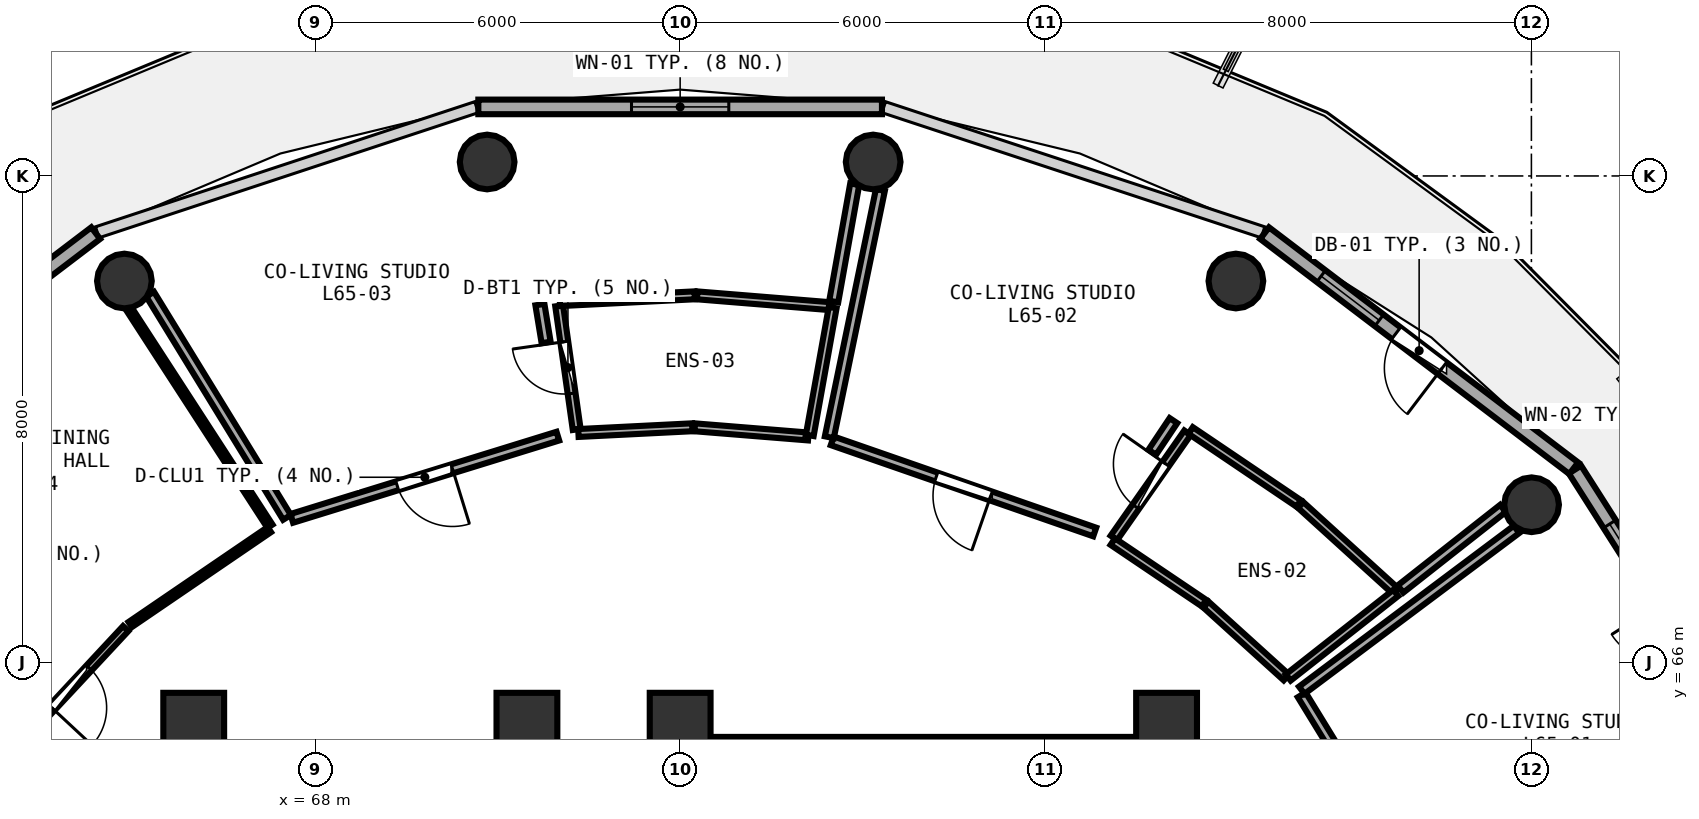
"""IFC4 building model, lengths in metres.
Left out: names, types, materials, properties, quantities, classifications, styles, units other than length and angle.
Written with IfcOpenShell. Run it as: python <this file> out.ifc"""

import sys

from ifc_helpers import new_model, si_unit, direction, frame, frame_2d, origin, origin_2d, place, context, subcontext, project, spatial, rectangle, circle, extrude, element, fill, save


model = new_model("IFC4")
c1 = context("Model", 3, precision=1e-05, world=origin(), true_north=direction((0.0, 1.0)))
c2 = subcontext(c1, "Body", "Model", "MODEL_VIEW")
j1 = project(units=[si_unit("LENGTHUNIT", "METRE"), si_unit("PLANEANGLEUNIT", "RADIAN")], contexts=[c1])
p1 = place(None, origin())
s1 = spatial("IfcSite", under=j1, at=p1, CompositionType="ELEMENT")
p2 = place(p1, origin())
s2 = spatial("IfcBuilding", under=s1, at=p2, CompositionType="ELEMENT")
p3 = place(p2, frame((0.0, 0.0, 256.2)))
s3 = spatial("IfcBuildingStorey", under=s2, at=p3, CompositionType="ELEMENT", Elevation=256.2)
for number, where, z_axis, x_axis in (
    (1, (82.0, 65.0, 0.0), (0.0, 0.0, 1.0), (1.0, 0.0, 0.0)),
    (2, (74.0, 65.0, 0.0), (0.0, 0.0, 1.0), (1.0, 0.0, 0.0)),
    (3, (71.48, 65.0, 0.0), (0.0, 0.0, 1.0), (1.0, 0.0, 0.0)),
    (4, (66.0, 65.0, 0.0), (0.0, 0.0, 1.0), (1.0, 0.0, 0.0)),
):
    element("IfcColumn", number, at=place(p3, frame(where, z_axis=z_axis, x_axis=x_axis)), inside=s3, PredefinedType="PILASTER", context=c2, shape_type="SweptSolid", body=[
        extrude(rectangle(XDim=1.0, YDim=1.0, at=origin_2d()), origin(), (0.0, 0.0, 1.0), 3.75),
    ])
for number, where, z_axis, x_axis in (
    (5, (88.003, 68.593, 0.0), (0.0, 0.0, 1.0), (1.0, 0.0, 0.0)),
    (6, (83.14, 72.272, 0.0), (0.0, 0.0, 1.0), (1.0, 0.0, 0.0)),
    (7, (77.174, 74.229, 0.0), (0.0, 0.0, 1.0), (1.0, 0.0, 0.0)),
    (8, (70.826, 74.229, 0.0), (0.0, 0.0, 1.0), (1.0, 0.0, 0.0)),
    (9, (64.86, 72.272, 0.0), (0.0, 0.0, 1.0), (1.0, 0.0, 0.0)),
):
    element("IfcColumn", number, at=place(p3, frame(where, z_axis=z_axis, x_axis=x_axis)), inside=s3, PredefinedType="COLUMN", context=c2, shape_type="SweptSolid", body=[
        extrude(circle(Radius=0.45, at=origin_2d()), origin(), (0.0, 0.0, 1.0), 3.75),
    ])
p4 = place(p3, frame((92.034, 63.964, 0.0), z_axis=(0.0, 0.0, 1.0), x_axis=(-0.537271968456, 0.843409053728, 0.0)))
e10 = element("IfcWall", 10, at=p4, inside=s3, PredefinedType="SOLIDWALL", context=c2, shape_type="SweptSolid", body=[
    extrude(rectangle(XDim=6.175, YDim=0.24, at=frame_2d((3.087, 0.0))), origin(), (0.0, 0.0, 1.0), 3.475),
])
p5 = place(p4, frame((2.613, 0.0, 0.0)))
e11 = element("IfcOpeningElement", 11, at=p5, cuts=e10, PredefinedType="OPENING", context=c2, shape_type="SweptSolid", body=[
    extrude(rectangle(XDim=0.95, YDim=2.1, at=frame_2d((0.475, 1.05))), frame((0.0, 0.13, 0.0), z_axis=(0.0, -1.0, 0.0), x_axis=(1.0, 0.0, 0.0)), (0.0, 0.0, 1.0), 0.26),
])
p6 = place(p4, frame((3.913, 0.0, 0.85)))
e12 = element("IfcOpeningElement", 12, at=p6, cuts=e10, PredefinedType="OPENING", context=c2, shape_type="SweptSolid", body=[
    extrude(rectangle(XDim=1.2, YDim=1.45, at=frame_2d((0.6, 0.725))), frame((0.0, 0.13, 0.0), z_axis=(0.0, -1.0, 0.0), x_axis=(1.0, 0.0, 0.0)), (0.0, 0.0, 1.0), 0.26),
])
p7 = place(p3, frame((88.696, 69.194, 0.0), z_axis=(0.0, 0.0, 1.0), x_axis=(-0.796010444211, 0.605282886514, 0.0)))
e13 = element("IfcWall", 13, at=p7, inside=s3, PredefinedType="SOLIDWALL", context=c2, shape_type="SweptSolid", body=[
    extrude(rectangle(XDim=6.387, YDim=0.24, at=frame_2d((3.194, 0.0))), origin(), (0.0, 0.0, 1.0), 3.475),
])
p8 = place(p7, frame((2.719, 0.0, 0.0)))
e14 = element("IfcOpeningElement", 14, at=p8, cuts=e13, PredefinedType="OPENING", context=c2, shape_type="SweptSolid", body=[
    extrude(rectangle(XDim=0.95, YDim=2.1, at=frame_2d((0.475, 1.05))), frame((0.0, 0.13, 0.0), z_axis=(0.0, -1.0, 0.0), x_axis=(1.0, 0.0, 0.0)), (0.0, 0.0, 1.0), 0.26),
])
p9 = place(p7, frame((4.019, 0.0, 0.85)))
e15 = element("IfcOpeningElement", 15, at=p9, cuts=e13, PredefinedType="OPENING", context=c2, shape_type="SweptSolid", body=[
    extrude(rectangle(XDim=1.2, YDim=1.45, at=frame_2d((0.6, 0.725))), frame((0.0, 0.13, 0.0), z_axis=(0.0, -1.0, 0.0), x_axis=(1.0, 0.0, 0.0)), (0.0, 0.0, 1.0), 0.26),
])
p10 = place(p3, frame((77.319, 75.136, 0.0), z_axis=(0.0, 0.0, 1.0), x_axis=(-1.0, 0.0, 0.0)))
e16 = element("IfcWall", 16, at=p10, inside=s3, PredefinedType="SOLIDWALL", context=c2, shape_type="SweptSolid", body=[
    extrude(rectangle(XDim=6.638, YDim=0.24, at=frame_2d((3.319, 0.0))), origin(), (0.0, 0.0, 1.0), 3.475),
])
p11 = place(p10, frame((2.519, 0.0, 0.85)))
e17 = element("IfcOpeningElement", 17, at=p11, cuts=e16, PredefinedType="OPENING", context=c2, shape_type="SweptSolid", body=[
    extrude(rectangle(XDim=1.6, YDim=1.45, at=frame_2d((0.8, 0.725))), frame((0.0, 0.13, 0.0), z_axis=(0.0, -1.0, 0.0), x_axis=(1.0, 0.0, 0.0)), (0.0, 0.0, 1.0), 0.26),
])
p12 = place(p3, frame((64.388, 73.06, 0.0), z_axis=(0.0, 0.0, 1.0), x_axis=(-0.796010444211, -0.605282886514, 0.0)))
e18 = element("IfcWall", 18, at=p12, inside=s3, PredefinedType="SOLIDWALL", context=c2, shape_type="SweptSolid", body=[
    extrude(rectangle(XDim=6.387, YDim=0.24, at=frame_2d((3.194, 0.0))), origin(), (0.0, 0.0, 1.0), 3.475),
])
p13 = place(p12, frame((2.394, 0.0, 0.85)))
e19 = element("IfcOpeningElement", 19, at=p13, cuts=e18, PredefinedType="OPENING", context=c2, shape_type="SweptSolid", body=[
    extrude(rectangle(XDim=1.6, YDim=1.45, at=frame_2d((0.8, 0.725))), frame((0.0, 0.13, 0.0), z_axis=(0.0, -1.0, 0.0), x_axis=(1.0, 0.0, 0.0)), (0.0, 0.0, 1.0), 0.26),
])
p14 = place(p3, frame((74.0, 64.6, 0.0), z_axis=(0.0, 0.0, 1.0), x_axis=(1.0, 0.0, 0.0)))
e20 = element("IfcWall", 20, at=p14, inside=s3, PredefinedType="SHEAR", context=c2, shape_type="SweptSolid", body=[
    extrude(rectangle(XDim=8.0, YDim=0.35, at=frame_2d((4.0, 0.0))), origin(), (0.0, 0.0, 1.0), 3.49),
])
p15 = place(p3, frame((86.456, 61.824, 0.0), z_axis=(0.0, 0.0, 1.0), x_axis=(-0.522665227064, 0.852538011128, 0.0)))
e21 = element("IfcWall", 21, at=p15, inside=s3, PredefinedType="PARTITIONING", context=c2, shape_type="SweptSolid", body=[
    extrude(rectangle(XDim=4.273, YDim=0.15, at=frame_2d((2.136, 0.0))), origin(), (0.0, 0.0, 1.0), 3.075),
])
p16 = place(p15, frame((1.661, 0.0, 0.0)))
e22 = element("IfcOpeningElement", 22, at=p16, cuts=e21, PredefinedType="OPENING", context=c2, shape_type="SweptSolid", body=[
    extrude(rectangle(XDim=0.95, YDim=2.08, at=frame_2d((0.475, 1.04))), frame((0.0, 0.085, 0.0), z_axis=(0.0, -1.0, 0.0), x_axis=(1.0, 0.0, 0.0)), (0.0, 0.0, 1.0), 0.17),
])
p17 = place(p3, frame((81.133, 68.047, 0.0), z_axis=(0.0, 0.0, 1.0), x_axis=(0.573578732096, 0.819150436787, 0.0)))
e23 = element("IfcWall", 23, at=p17, inside=s3, PredefinedType="PLUMBINGWALL", context=c2, shape_type="SweptSolid", body=[
    extrude(rectangle(XDim=2.112, YDim=0.13, at=frame_2d((1.056, 0.0))), origin(), (0.0, 0.0, 1.0), 3.175),
])
p18 = place(p17, frame((0.626, 0.0, 0.0)))
e24 = element("IfcOpeningElement", 24, at=p18, cuts=e23, PredefinedType="OPENING", context=c2, shape_type="SweptSolid", body=[
    extrude(rectangle(XDim=0.86, YDim=2.05, at=frame_2d((0.43, 1.025))), frame((0.0, 0.075, 0.0), z_axis=(0.0, -1.0, 0.0), x_axis=(1.0, 0.0, 0.0)), (0.0, 0.0, 1.0), 0.15),
])
p19 = place(p3, frame((80.818, 68.145, 0.0), z_axis=(0.0, 0.0, 1.0), x_axis=(-0.944627899296, 0.328143462331, 0.0)))
e25 = element("IfcWall", 25, at=p19, inside=s3, PredefinedType="PARTITIONING", context=c2, shape_type="SweptSolid", body=[
    extrude(rectangle(XDim=4.57, YDim=0.15, at=frame_2d((2.285, 0.0))), origin(), (0.0, 0.0, 1.0), 3.48),
])
p20 = place(p19, frame((1.81, 0.0, 0.0)))
e26 = element("IfcOpeningElement", 26, at=p20, cuts=e25, PredefinedType="OPENING", context=c2, shape_type="SweptSolid", body=[
    extrude(rectangle(XDim=0.95, YDim=2.08, at=frame_2d((0.475, 1.04))), frame((0.0, 0.085, 0.0), z_axis=(0.0, -1.0, 0.0), x_axis=(1.0, 0.0, 0.0)), (0.0, 0.0, 1.0), 0.17),
])
p21 = place(p3, frame((72.299, 69.831, 0.0), z_axis=(0.0, 0.0, 1.0), x_axis=(-0.14028943716, 0.990110536163, 0.0)))
e27 = element("IfcWall", 27, at=p21, inside=s3, PredefinedType="PLUMBINGWALL", context=c2, shape_type="SweptSolid", body=[
    extrude(rectangle(XDim=2.053, YDim=0.13, at=frame_2d((1.027, 0.0))), origin(), (0.0, 0.0, 1.0), 3.175),
])
p22 = place(p21, frame((0.597, 0.0, 0.0)))
e28 = element("IfcOpeningElement", 28, at=p22, cuts=e27, PredefinedType="OPENING", context=c2, shape_type="SweptSolid", body=[
    extrude(rectangle(XDim=0.86, YDim=2.05, at=frame_2d((0.43, 1.025))), frame((0.0, 0.075, 0.0), z_axis=(0.0, -1.0, 0.0), x_axis=(1.0, 0.0, 0.0)), (0.0, 0.0, 1.0), 0.15),
])
p23 = place(p3, frame((71.989, 69.721, 0.0), z_axis=(0.0, 0.0, 1.0), x_axis=(-0.955414123224, -0.295269119863, 0.0)))
e29 = element("IfcWall", 29, at=p23, inside=s3, PredefinedType="PARTITIONING", context=c2, shape_type="SweptSolid", body=[
    extrude(rectangle(XDim=4.581, YDim=0.15, at=frame_2d((2.291, 0.0))), origin(), (0.0, 0.0, 1.0), 3.075),
])
p24 = place(p23, frame((1.815, 0.0, 0.0)))
e30 = element("IfcOpeningElement", 30, at=p24, cuts=e29, PredefinedType="OPENING", context=c2, shape_type="SweptSolid", body=[
    extrude(rectangle(XDim=0.95, YDim=2.08, at=frame_2d((0.475, 1.04))), frame((0.0, 0.085, 0.0), z_axis=(0.0, -1.0, 0.0), x_axis=(1.0, 0.0, 0.0)), (0.0, 0.0, 1.0), 0.17),
])
p25 = place(p3, frame((64.882, 66.557, 0.0), z_axis=(0.0, 0.0, 1.0), x_axis=(-0.681315269885, -0.731990097625, 0.0)))
e31 = element("IfcWall", 31, at=p25, inside=s3, PredefinedType="PARTITIONING", context=c2, shape_type="SweptSolid", body=[
    extrude(rectangle(XDim=2.664, YDim=0.12, at=frame_2d((1.332, 0.0))), origin(), (0.0, 0.0, 1.0), 3.075),
])
p26 = place(p25, frame((0.882, 0.0, 0.0)))
e32 = element("IfcOpeningElement", 32, at=p26, cuts=e31, PredefinedType="OPENING", context=c2, shape_type="SweptSolid", body=[
    extrude(rectangle(XDim=0.9, YDim=2.08, at=frame_2d((0.45, 1.04))), frame((0.0, 0.07, 0.0), z_axis=(0.0, -1.0, 0.0), x_axis=(1.0, 0.0, 0.0)), (0.0, 0.0, 1.0), 0.14),
])
p27 = place(p3, frame((84.223, 65.542, 0.0), z_axis=(0.0, 0.0, 1.0), x_axis=(0.800384816546, 0.599486568191, 0.0)))
e33 = element("IfcWall", 33, at=p27, inside=s3, PredefinedType="PARTITIONING", context=c2, shape_type="SweptSolid", body=[
    extrude(rectangle(XDim=4.414, YDim=0.15, at=frame_2d((2.207, 0.0))), origin(), (0.0, 0.0, 1.0), 3.175),
])
p28 = place(p3, frame((83.97, 65.753, 0.0), z_axis=(0.0, 0.0, 1.0), x_axis=(-0.741337974143, 0.671131885767, 0.0)))
e34 = element("IfcWall", 34, at=p28, inside=s3, PredefinedType="PLUMBINGWALL", context=c2, shape_type="SweptSolid", body=[
    extrude(rectangle(XDim=1.784, YDim=0.13, at=frame_2d((0.892, 0.0))), origin(), (0.0, 0.0, 1.0), 3.075),
])
p29 = place(p3, frame((82.616, 66.975, 0.0), z_axis=(0.0, 0.0, 1.0), x_axis=(-0.82921750612, 0.558926048367, 0.0)))
e35 = element("IfcWall", 35, at=p29, inside=s3, PredefinedType="PLUMBINGWALL", context=c2, shape_type="SweptSolid", body=[
    extrude(rectangle(XDim=1.81, YDim=0.13, at=frame_2d((0.905, 0.0))), origin(), (0.0, 0.0, 1.0), 3.075),
])
p30 = place(p3, frame((82.396, 69.815, 0.0), z_axis=(0.0, 0.0, 1.0), x_axis=(0.828761584291, -0.559601855254, 0.0)))
e36 = element("IfcWall", 36, at=p30, inside=s3, PredefinedType="PLUMBINGWALL", context=c2, shape_type="SweptSolid", body=[
    extrude(rectangle(XDim=2.145, YDim=0.13, at=frame_2d((1.073, 0.0))), origin(), (0.0, 0.0, 1.0), 3.075),
])
p31 = place(p3, frame((84.205, 68.59, 0.0), z_axis=(0.0, 0.0, 1.0), x_axis=(0.740404918602, -0.672161109043, 0.0)))
e37 = element("IfcWall", 37, at=p31, inside=s3, PredefinedType="PLUMBINGWALL", context=c2, shape_type="SweptSolid", body=[
    extrude(rectangle(XDim=2.114, YDim=0.13, at=frame_2d((1.057, 0.0))), origin(), (0.0, 0.0, 1.0), 3.075),
])
p32 = place(p3, frame((85.769, 67.143, 0.0), z_axis=(0.0, 0.0, 1.0), x_axis=(-0.786197810061, -0.617974921381, 0.0)))
e38 = element("IfcWall", 38, at=p32, inside=s3, PredefinedType="PLUMBINGWALL", context=c2, shape_type="SweptSolid", body=[
    extrude(rectangle(XDim=2.25, YDim=0.13, at=frame_2d((1.125, 0.0))), origin(), (0.0, 0.0, 1.0), 3.075),
])
p33 = place(p3, frame((76.453, 69.703, 0.0), z_axis=(0.0, 0.0, 1.0), x_axis=(0.202308141573, 0.979321916355, 0.0)))
e39 = element("IfcWall", 39, at=p33, inside=s3, PredefinedType="PARTITIONING", context=c2, shape_type="SweptSolid", body=[
    extrude(rectangle(XDim=4.153, YDim=0.15, at=frame_2d((2.076, 0.0))), origin(), (0.0, 0.0, 1.0), 3.175),
])
p34 = place(p3, frame((87.532, 68.533, 0.0), z_axis=(0.0, 0.0, 1.0), x_axis=(-0.785832073147, -0.618439934685, 0.0)))
e40 = element("IfcWall", 40, at=p34, inside=s3, PredefinedType="PARTITIONING", context=c2, shape_type="SweptSolid", body=[
    extrude(rectangle(XDim=2.144, YDim=0.15, at=frame_2d((1.072, 0.0))), origin(), (0.0, 0.0, 1.0), 3.075),
])
p35 = place(p3, frame((82.113, 69.977, 0.0), z_axis=(0.0, 0.0, 1.0), x_axis=(-0.555598996852, -0.831450392204, 0.0)))
e41 = element("IfcWall", 41, at=p35, inside=s3, PredefinedType="PARTITIONING", context=c2, shape_type="SweptSolid", body=[
    extrude(rectangle(XDim=0.627, YDim=0.15, at=frame_2d((0.313, 0.0))), origin(), (0.0, 0.0, 1.0), 3.175),
])
p36 = place(p3, frame((76.108, 69.716, 0.0), z_axis=(0.0, 0.0, 1.0), x_axis=(-0.996754521178, 0.080501083911, 0.0)))
e42 = element("IfcWall", 42, at=p36, inside=s3, PredefinedType="PLUMBINGWALL", context=c2, shape_type="SweptSolid", body=[
    extrude(rectangle(XDim=1.874, YDim=0.13, at=frame_2d((0.937, 0.0))), origin(), (0.0, 0.0, 1.0), 3.075),
])
p37 = place(p3, frame((74.2, 69.867, 0.0), z_axis=(0.0, 0.0, 1.0), x_axis=(-0.998743232436, -0.050119414036, 0.0)))
e43 = element("IfcWall", 43, at=p37, inside=s3, PredefinedType="PLUMBINGWALL", context=c2, shape_type="SweptSolid", body=[
    extrude(rectangle(XDim=1.875, YDim=0.13, at=frame_2d((0.938, 0.0))), origin(), (0.0, 0.0, 1.0), 3.48),
])
p38 = place(p3, frame((72.022, 71.925, 0.0), z_axis=(0.0, 0.0, 1.0), x_axis=(0.998726159472, 0.050458481805, 0.0)))
e44 = element("IfcWall", 44, at=p38, inside=s3, PredefinedType="PLUMBINGWALL", context=c2, shape_type="SweptSolid", body=[
    extrude(rectangle(XDim=2.221, YDim=0.13, at=frame_2d((1.11, 0.0))), origin(), (0.0, 0.0, 1.0), 3.48),
])
p39 = place(p3, frame((74.28, 72.036, 0.0), z_axis=(0.0, 0.0, 1.0), x_axis=(0.996718024019, -0.080951717687, 0.0)))
e45 = element("IfcWall", 45, at=p39, inside=s3, PredefinedType="PLUMBINGWALL", context=c2, shape_type="SweptSolid", body=[
    extrude(rectangle(XDim=2.22, YDim=0.13, at=frame_2d((1.11, 0.0))), origin(), (0.0, 0.0, 1.0), 3.075),
])
p40 = place(p3, frame((76.509, 71.835, 0.0), z_axis=(0.0, 0.0, 1.0), x_axis=(-0.176550443794, -0.984291593379, 0.0)))
e46 = element("IfcWall", 46, at=p40, inside=s3, PredefinedType="PLUMBINGWALL", context=c2, shape_type="SweptSolid", body=[
    extrude(rectangle(XDim=2.135, YDim=0.13, at=frame_2d((1.067, 0.0))), origin(), (0.0, 0.0, 1.0), 3.075),
])
p41 = place(p3, frame((67.534, 68.385, 0.0), z_axis=(0.0, 0.0, 1.0), x_axis=(-0.522784059663, 0.852465147066, 0.0)))
e47 = element("IfcWall", 47, at=p41, inside=s3, PredefinedType="PARTITIONING", context=c2, shape_type="SweptSolid", body=[
    extrude(rectangle(XDim=4.306, YDim=0.15, at=frame_2d((2.153, 0.0))), origin(), (0.0, 0.0, 1.0), 3.175),
])
p42 = place(p3, frame((76.871, 73.864, 0.0), z_axis=(0.0, 0.0, 1.0), x_axis=(-0.176100981623, -0.98437210661, 0.0)))
e48 = element("IfcWall", 48, at=p42, inside=s3, PredefinedType="PARTITIONING", context=c2, shape_type="SweptSolid", body=[
    extrude(rectangle(XDim=1.96, YDim=0.15, at=frame_2d((0.98, 0.0))), origin(), (0.0, 0.0, 1.0), 3.075),
])
p43 = place(p3, frame((71.694, 71.885, 0.0), z_axis=(0.0, 0.0, 1.0), x_axis=(0.162139500997, -0.986767846161, 0.0)))
e49 = element("IfcWall", 49, at=p43, inside=s3, PredefinedType="PARTITIONING", context=c2, shape_type="SweptSolid", body=[
    extrude(rectangle(XDim=0.631, YDim=0.15, at=frame_2d((0.315, 0.0))), origin(), (0.0, 0.0, 1.0), 3.48),
])
p44 = place(p3, frame((67.243, 68.184, 0.0), z_axis=(0.0, 0.0, 1.0), x_axis=(-0.826087380575, -0.563542047814, 0.0)))
e50 = element("IfcWall", 50, at=p44, inside=s3, PredefinedType="PARTITIONING", context=c2, shape_type="SweptSolid", body=[
    extrude(rectangle(XDim=2.768, YDim=0.1, at=frame_2d((1.384, 0.0))), origin(), (0.0, 0.0, 1.0), 3.075),
])
p45 = place(p3, frame((64.942, 71.804, 0.0), z_axis=(0.0, 0.0, 1.0), x_axis=(0.544234825024, -0.838932926539, 0.0)))
e51 = element("IfcWall", 51, at=p45, inside=s3, PredefinedType="PARTITIONING", context=c2, shape_type="SweptSolid", body=[
    extrude(rectangle(XDim=4.249, YDim=0.1, at=frame_2d((2.125, 0.0))), origin(), (0.0, 0.0, 1.0), 3.075),
])
p46 = place(p6, origin())
e52 = element("IfcWindow", 52, at=p46, inside=s3, PartitioningType="SINGLE_PANEL", PredefinedType="WINDOW", context=c2, shape_type="SweptSolid", body=[
    extrude(rectangle(XDim=1.2, YDim=1.45, at=frame_2d((0.6, 0.725))), frame((0.0, 0.03, 0.0), z_axis=(0.0, -1.0, 0.0), x_axis=(1.0, 0.0, 0.0)), (0.0, 0.0, 1.0), 0.06),
])
fill(e12, e52)
p47 = place(p8, frame((0.95, 0.0, 0.0), z_axis=(0.0, 0.0, 1.0), x_axis=(-1.0, 0.0, 0.0)))
e53 = element("IfcDoor", 53, at=p47, inside=s3, OperationType="SINGLE_SWING_RIGHT", PredefinedType="DOOR", context=c2, shape_type="SweptSolid", body=[
    extrude(rectangle(XDim=0.95, YDim=2.1, at=frame_2d((0.475, 1.05))), frame((0.0, 0.025, 0.0), z_axis=(0.0, -1.0, 0.0), x_axis=(1.0, 0.0, 0.0)), (0.0, 0.0, 1.0), 0.05),
])
fill(e14, e53)
p48 = place(p9, origin())
e54 = element("IfcWindow", 54, at=p48, inside=s3, PartitioningType="SINGLE_PANEL", PredefinedType="WINDOW", context=c2, shape_type="SweptSolid", body=[
    extrude(rectangle(XDim=1.2, YDim=1.45, at=frame_2d((0.6, 0.725))), frame((0.0, 0.03, 0.0), z_axis=(0.0, -1.0, 0.0), x_axis=(1.0, 0.0, 0.0)), (0.0, 0.0, 1.0), 0.06),
])
fill(e15, e54)
p49 = place(p11, origin())
e55 = element("IfcWindow", 55, at=p49, inside=s3, PartitioningType="SINGLE_PANEL", PredefinedType="WINDOW", context=c2, shape_type="SweptSolid", body=[
    extrude(rectangle(XDim=1.6, YDim=1.45, at=frame_2d((0.8, 0.725))), frame((0.0, 0.03, 0.0), z_axis=(0.0, -1.0, 0.0), x_axis=(1.0, 0.0, 0.0)), (0.0, 0.0, 1.0), 0.06),
])
fill(e17, e55)
p50 = place(p18, origin())
e56 = element("IfcDoor", 56, at=p50, inside=s3, OperationType="SINGLE_SWING_RIGHT", PredefinedType="DOOR", context=c2, shape_type="SweptSolid", body=[
    extrude(rectangle(XDim=0.86, YDim=2.05, at=frame_2d((0.43, 1.025))), frame((0.0, 0.025, 0.0), z_axis=(0.0, -1.0, 0.0), x_axis=(1.0, 0.0, 0.0)), (0.0, 0.0, 1.0), 0.05),
])
fill(e24, e56)
p51 = place(p20, origin())
e57 = element("IfcDoor", 57, at=p51, inside=s3, OperationType="SINGLE_SWING_LEFT", PredefinedType="DOOR", context=c2, shape_type="SweptSolid", body=[
    extrude(rectangle(XDim=0.95, YDim=2.08, at=frame_2d((0.475, 1.04))), frame((0.0, 0.025, 0.0), z_axis=(0.0, -1.0, 0.0), x_axis=(1.0, 0.0, 0.0)), (0.0, 0.0, 1.0), 0.05),
])
fill(e26, e57)
p52 = place(p22, origin())
e58 = element("IfcDoor", 58, at=p52, inside=s3, OperationType="SINGLE_SWING_RIGHT", PredefinedType="DOOR", context=c2, shape_type="SweptSolid", body=[
    extrude(rectangle(XDim=0.86, YDim=2.05, at=frame_2d((0.43, 1.025))), frame((0.0, 0.025, 0.0), z_axis=(0.0, -1.0, 0.0), x_axis=(1.0, 0.0, 0.0)), (0.0, 0.0, 1.0), 0.05),
])
fill(e28, e58)
p53 = place(p24, origin())
e59 = element("IfcDoor", 59, at=p53, inside=s3, OperationType="SINGLE_SWING_LEFT", PredefinedType="DOOR", context=c2, shape_type="SweptSolid", body=[
    extrude(rectangle(XDim=0.95, YDim=2.08, at=frame_2d((0.475, 1.04))), frame((0.0, 0.025, 0.0), z_axis=(0.0, -1.0, 0.0), x_axis=(1.0, 0.0, 0.0)), (0.0, 0.0, 1.0), 0.05),
])
fill(e30, e59)
p54 = place(p26, origin())
e60 = element("IfcDoor", 60, at=p54, inside=s3, OperationType="SINGLE_SWING_RIGHT", PredefinedType="DOOR", context=c2, shape_type="SweptSolid", body=[
    extrude(rectangle(XDim=0.9, YDim=2.08, at=frame_2d((0.45, 1.04))), frame((0.0, 0.025, 0.0), z_axis=(0.0, -1.0, 0.0), x_axis=(1.0, 0.0, 0.0)), (0.0, 0.0, 1.0), 0.05),
])
fill(e32, e60)
save(model, sys.argv[1])
